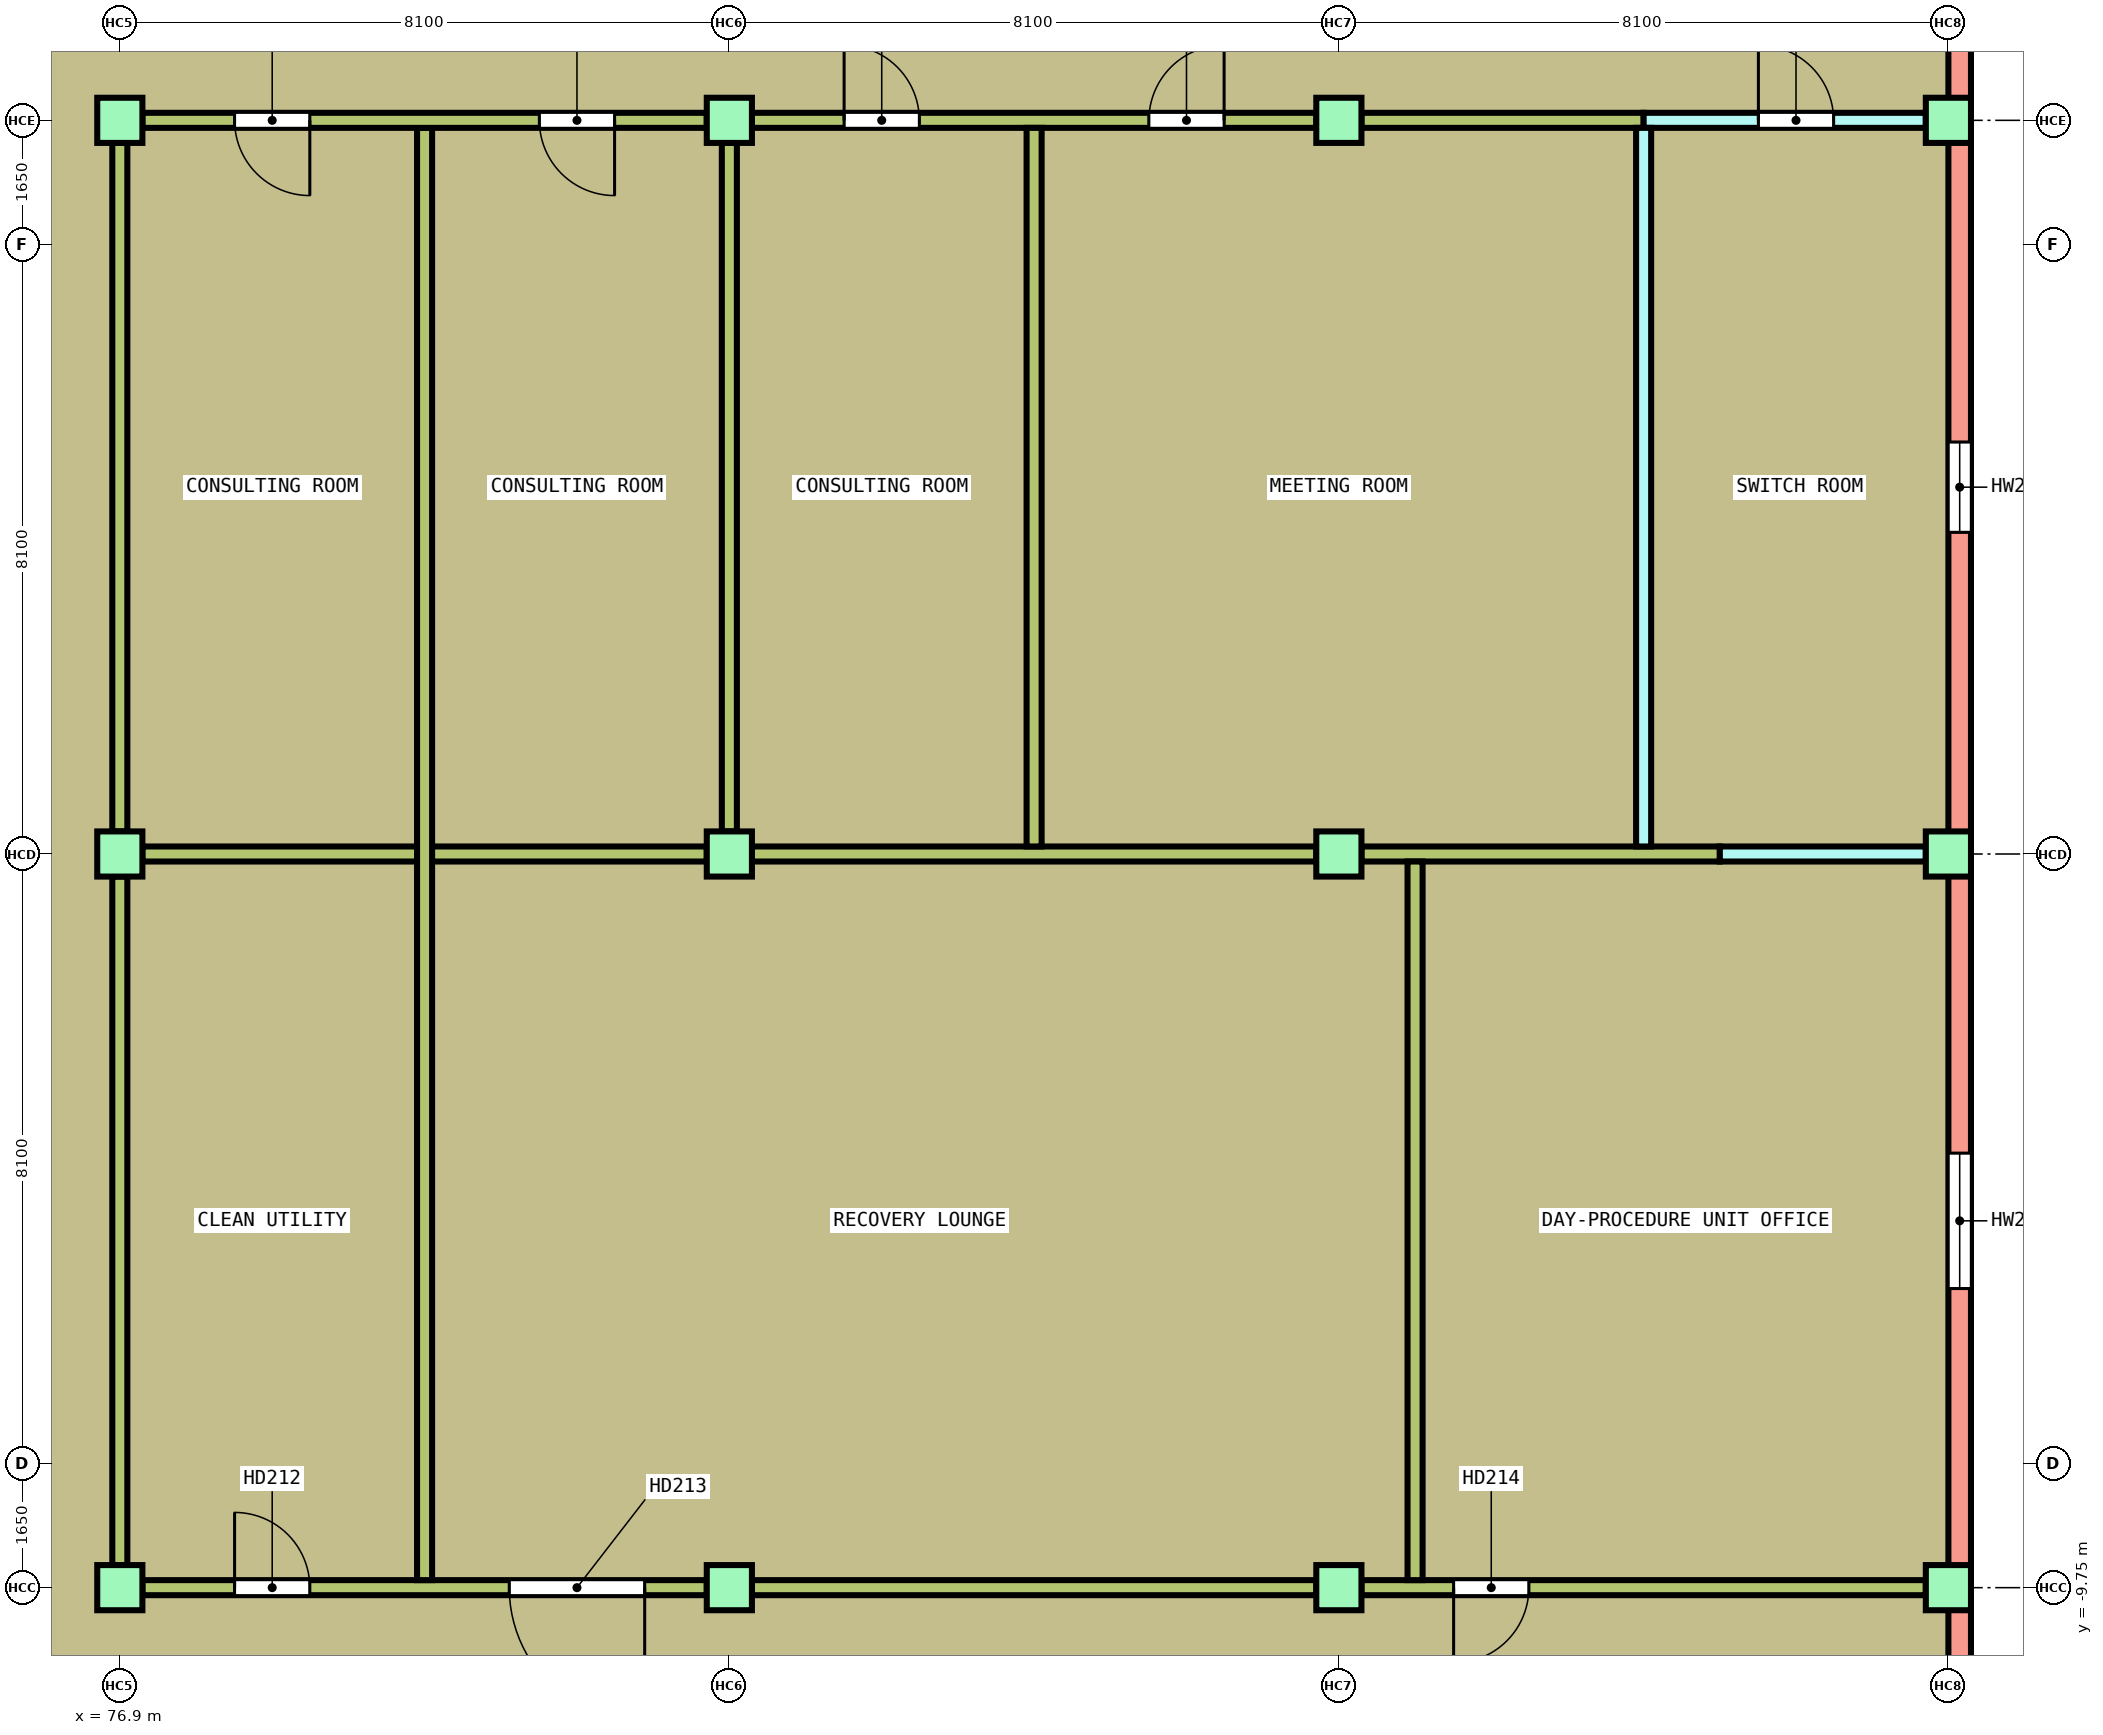
"""IFC4 building model, lengths in metres.
Left out: names, types, materials, properties, quantities, classifications, styles, units other than length and angle.
Written with IfcOpenShell. Run it as: python <this file> out.ifc"""

import sys

from ifc_helpers import new_model, si_unit, direction, frame, frame_2d, origin, origin_2d, place, context, subcontext, project, spatial, rectangle, extrude, element, fill, save


model = new_model("IFC4")
c1 = context("Model", 3, precision=1e-05, world=origin(), true_north=direction((0.0, 1.0)))
c2 = subcontext(c1, "Body", "Model", "MODEL_VIEW")
j1 = project(units=[si_unit("LENGTHUNIT", "METRE"), si_unit("PLANEANGLEUNIT", "RADIAN")], contexts=[c1])
p1 = place(None, origin())
s1 = spatial("IfcSite", under=j1, at=p1, CompositionType="ELEMENT")
p2 = place(p1, origin())
s2 = spatial("IfcBuilding", under=s1, at=p2, CompositionType="ELEMENT")
p3 = place(p2, frame((0.0, 0.0, 10.2)))
s3 = spatial("IfcBuildingStorey", under=s2, at=p3, CompositionType="ELEMENT", Elevation=10.2)
for number, where, z_axis, x_axis in (
    (1, (76.9, -9.75, 0.0), (0.0, 0.0, 1.0), (1.0, 0.0, 0.0)),
    (2, (85.0, -9.75, 0.0), (0.0, 0.0, 1.0), (1.0, 0.0, 0.0)),
    (3, (93.1, -9.75, 0.0), (0.0, 0.0, 1.0), (1.0, 0.0, 0.0)),
    (4, (101.2, -9.75, 0.0), (0.0, 0.0, 1.0), (1.0, 0.0, 0.0)),
    (5, (76.9, 0.0, 0.0), (0.0, 0.0, 1.0), (1.0, 0.0, 0.0)),
    (6, (85.0, 0.0, 0.0), (0.0, 0.0, 1.0), (1.0, 0.0, 0.0)),
    (7, (93.1, 0.0, 0.0), (0.0, 0.0, 1.0), (1.0, 0.0, 0.0)),
    (8, (101.2, 0.0, 0.0), (0.0, 0.0, 1.0), (1.0, 0.0, 0.0)),
    (9, (76.9, 9.75, 0.0), (0.0, 0.0, 1.0), (1.0, 0.0, 0.0)),
    (10, (85.0, 9.75, 0.0), (0.0, 0.0, 1.0), (1.0, 0.0, 0.0)),
    (11, (93.1, 9.75, 0.0), (0.0, 0.0, 1.0), (1.0, 0.0, 0.0)),
    (12, (101.2, 9.75, 0.0), (0.0, 0.0, 1.0), (1.0, 0.0, 0.0)),
):
    element("IfcColumn", number, at=place(p3, frame(where, z_axis=z_axis, x_axis=x_axis)), inside=s3, PredefinedType="COLUMN", context=c2, shape_type="SweptSolid", body=[
        extrude(rectangle(XDim=0.6, YDim=0.6, at=origin_2d()), origin(), (0.0, 0.0, 1.0), 4.15),
    ])
for number, where, z_axis, x_axis in (
    (13, (76.9, -9.45, 0.0), (0.0, 0.0, 1.0), (0.0, 1.0, 0.0)),
    (14, (76.9, 0.3, 0.0), (0.0, 0.0, 1.0), (0.0, 1.0, 0.0)),
):
    element("IfcWall", number, at=place(p3, frame(where, z_axis=z_axis, x_axis=x_axis)), inside=s3, PredefinedType="PARTITIONING", context=c2, shape_type="SweptSolid", body=[
        extrude(rectangle(XDim=9.15, YDim=0.2, at=frame_2d((4.575, 0.0))), origin(), (0.0, 0.0, 1.0), 3.6),
    ])
p4 = place(p3, frame((77.2, -9.75, 0.0), z_axis=(0.0, 0.0, 1.0), x_axis=(1.0, 0.0, 0.0)))
e15 = element("IfcWall", 15, at=p4, inside=s3, PredefinedType="PARTITIONING", context=c2, shape_type="SweptSolid", body=[
    extrude(rectangle(XDim=7.5, YDim=0.2, at=frame_2d((3.75, 0.0))), origin(), (0.0, 0.0, 1.0), 3.6),
])
p5 = place(p4, frame((1.225, 0.0, 0.0)))
e16 = element("IfcOpeningElement", 16, at=p5, cuts=e15, PredefinedType="OPENING", context=c2, shape_type="SweptSolid", body=[
    extrude(rectangle(XDim=1.0, YDim=2.1, at=frame_2d((0.5, 1.05))), frame((0.0, 0.11, 0.0), z_axis=(0.0, -1.0, 0.0), x_axis=(1.0, 0.0, 0.0)), (0.0, 0.0, 1.0), 0.22),
])
p6 = place(p4, frame((4.875, 0.0, 0.0)))
e17 = element("IfcOpeningElement", 17, at=p6, cuts=e15, PredefinedType="OPENING", context=c2, shape_type="SweptSolid", body=[
    extrude(rectangle(XDim=1.8, YDim=2.1, at=frame_2d((0.9, 1.05))), frame((0.0, 0.11, 0.0), z_axis=(0.0, -1.0, 0.0), x_axis=(1.0, 0.0, 0.0)), (0.0, 0.0, 1.0), 0.22),
])
p7 = place(p3, frame((85.3, -9.75, 0.0), z_axis=(0.0, 0.0, 1.0), x_axis=(1.0, 0.0, 0.0)))
e18 = element("IfcWall", 18, at=p7, inside=s3, PredefinedType="PARTITIONING", context=c2, shape_type="SweptSolid", body=[
    extrude(rectangle(XDim=7.5, YDim=0.2, at=frame_2d((3.75, 0.0))), origin(), (0.0, 0.0, 1.0), 3.6),
])
p8 = place(p3, frame((93.4, -9.75, 0.0), z_axis=(0.0, 0.0, 1.0), x_axis=(1.0, 0.0, 0.0)))
e19 = element("IfcWall", 19, at=p8, inside=s3, PredefinedType="PARTITIONING", context=c2, shape_type="SweptSolid", body=[
    extrude(rectangle(XDim=7.5, YDim=0.2, at=frame_2d((3.75, 0.0))), origin(), (0.0, 0.0, 1.0), 3.6),
])
p9 = place(p8, frame((1.225, 0.0, 0.0)))
e20 = element("IfcOpeningElement", 20, at=p9, cuts=e19, PredefinedType="OPENING", context=c2, shape_type="SweptSolid", body=[
    extrude(rectangle(XDim=1.0, YDim=2.1, at=frame_2d((0.5, 1.05))), frame((0.0, 0.11, 0.0), z_axis=(0.0, -1.0, 0.0), x_axis=(1.0, 0.0, 0.0)), (0.0, 0.0, 1.0), 0.22),
])
p10 = place(p3, frame((101.35, 20.25, 0.0), z_axis=(0.0, 0.0, 1.0), x_axis=(0.0, -1.0, 0.0)))
e21 = element("IfcWall", 21, at=p10, inside=s3, PredefinedType="SOLIDWALL", context=c2, shape_type="SweptSolid", body=[
    extrude(rectangle(XDim=33.0, YDim=0.3, at=frame_2d((16.5, 0.0))), origin(), (0.0, 0.0, 1.0), 3.6),
])
p11 = place(p10, frame((24.225, 0.0, 0.9)))
e22 = element("IfcOpeningElement", 22, at=p11, cuts=e21, PredefinedType="OPENING", context=c2, shape_type="SweptSolid", body=[
    extrude(rectangle(XDim=1.8, YDim=1.8, at=frame_2d((0.9, 0.9))), frame((0.0, 0.16, 0.0), z_axis=(0.0, -1.0, 0.0), x_axis=(1.0, 0.0, 0.0)), (0.0, 0.0, 1.0), 0.32),
])
p12 = place(p10, frame((14.775, 0.0, 1.5)))
e23 = element("IfcOpeningElement", 23, at=p12, cuts=e21, PredefinedType="OPENING", context=c2, shape_type="SweptSolid", body=[
    extrude(rectangle(XDim=1.2, YDim=0.9, at=frame_2d((0.6, 0.45))), frame((0.0, 0.16, 0.0), z_axis=(0.0, -1.0, 0.0), x_axis=(1.0, 0.0, 0.0)), (0.0, 0.0, 1.0), 0.32),
])
for number, where, z_axis, x_axis in (
    (24, (77.2, 0.0, 0.0), (0.0, 0.0, 1.0), (1.0, 0.0, 0.0)),
    (25, (85.3, 0.0, 0.0), (0.0, 0.0, 1.0), (1.0, 0.0, 0.0)),
):
    element("IfcWall", number, at=place(p3, frame(where, z_axis=z_axis, x_axis=x_axis)), inside=s3, PredefinedType="PARTITIONING", context=c2, shape_type="SweptSolid", body=[
        extrude(rectangle(XDim=7.5, YDim=0.2, at=frame_2d((3.75, 0.0))), origin(), (0.0, 0.0, 1.0), 3.6),
    ])
p13 = place(p3, frame((93.4, 0.0, 0.0), z_axis=(0.0, 0.0, 1.0), x_axis=(1.0, 0.0, 0.0)))
e26 = element("IfcWall", 26, at=p13, inside=s3, PredefinedType="PARTITIONING", context=c2, shape_type="SweptSolid", body=[
    extrude(rectangle(XDim=4.763, YDim=0.2, at=frame_2d((2.381, 0.0))), origin(), (0.0, 0.0, 1.0), 3.6),
])
p14 = place(p3, frame((98.163, 0.0, 0.0), z_axis=(0.0, 0.0, 1.0), x_axis=(1.0, 0.0, 0.0)))
e27 = element("IfcWall", 27, at=p14, inside=s3, PredefinedType="SOLIDWALL", context=c2, shape_type="SweptSolid", body=[
    extrude(rectangle(XDim=2.737, YDim=0.2, at=frame_2d((1.369, 0.0))), origin(), (0.0, 0.0, 1.0), 3.6),
])
p15 = place(p3, frame((80.95, -9.65, 0.0), z_axis=(0.0, 0.0, 1.0), x_axis=(0.0, 1.0, 0.0)))
e28 = element("IfcWall", 28, at=p15, inside=s3, PredefinedType="PARTITIONING", context=c2, shape_type="SweptSolid", body=[
    extrude(rectangle(XDim=19.3, YDim=0.2, at=frame_2d((9.65, 0.0))), origin(), (0.0, 0.0, 1.0), 3.6),
])
p16 = place(p3, frame((94.113, -9.65, 0.0), z_axis=(0.0, 0.0, 1.0), x_axis=(0.0, 1.0, 0.0)))
e29 = element("IfcWall", 29, at=p16, inside=s3, PredefinedType="PARTITIONING", context=c2, shape_type="SweptSolid", body=[
    extrude(rectangle(XDim=9.55, YDim=0.2, at=frame_2d((4.775, 0.0))), origin(), (0.0, 0.0, 1.0), 3.6),
])
p17 = place(p3, frame((77.2, 9.75, 0.0), z_axis=(0.0, 0.0, 1.0), x_axis=(1.0, 0.0, 0.0)))
e30 = element("IfcWall", 30, at=p17, inside=s3, PredefinedType="PARTITIONING", context=c2, shape_type="SweptSolid", body=[
    extrude(rectangle(XDim=7.5, YDim=0.2, at=frame_2d((3.75, 0.0))), origin(), (0.0, 0.0, 1.0), 3.6),
])
p18 = place(p17, frame((1.225, 0.0, 0.0)))
e31 = element("IfcOpeningElement", 31, at=p18, cuts=e30, PredefinedType="OPENING", context=c2, shape_type="SweptSolid", body=[
    extrude(rectangle(XDim=1.0, YDim=2.1, at=frame_2d((0.5, 1.05))), frame((0.0, 0.11, 0.0), z_axis=(0.0, -1.0, 0.0), x_axis=(1.0, 0.0, 0.0)), (0.0, 0.0, 1.0), 0.22),
])
p19 = place(p17, frame((5.275, 0.0, 0.0)))
e32 = element("IfcOpeningElement", 32, at=p19, cuts=e30, PredefinedType="OPENING", context=c2, shape_type="SweptSolid", body=[
    extrude(rectangle(XDim=1.0, YDim=2.1, at=frame_2d((0.5, 1.05))), frame((0.0, 0.11, 0.0), z_axis=(0.0, -1.0, 0.0), x_axis=(1.0, 0.0, 0.0)), (0.0, 0.0, 1.0), 0.22),
])
p20 = place(p3, frame((85.3, 9.75, 0.0), z_axis=(0.0, 0.0, 1.0), x_axis=(1.0, 0.0, 0.0)))
e33 = element("IfcWall", 33, at=p20, inside=s3, PredefinedType="PARTITIONING", context=c2, shape_type="SweptSolid", body=[
    extrude(rectangle(XDim=7.5, YDim=0.2, at=frame_2d((3.75, 0.0))), origin(), (0.0, 0.0, 1.0), 3.6),
])
p21 = place(p20, frame((1.225, 0.0, 0.0)))
e34 = element("IfcOpeningElement", 34, at=p21, cuts=e33, PredefinedType="OPENING", context=c2, shape_type="SweptSolid", body=[
    extrude(rectangle(XDim=1.0, YDim=2.1, at=frame_2d((0.5, 1.05))), frame((0.0, 0.11, 0.0), z_axis=(0.0, -1.0, 0.0), x_axis=(1.0, 0.0, 0.0)), (0.0, 0.0, 1.0), 0.22),
])
p22 = place(p20, frame((5.275, 0.0, 0.0)))
e35 = element("IfcOpeningElement", 35, at=p22, cuts=e33, PredefinedType="OPENING", context=c2, shape_type="SweptSolid", body=[
    extrude(rectangle(XDim=1.0, YDim=2.1, at=frame_2d((0.5, 1.05))), frame((0.0, 0.11, 0.0), z_axis=(0.0, -1.0, 0.0), x_axis=(1.0, 0.0, 0.0)), (0.0, 0.0, 1.0), 0.22),
])
p23 = place(p3, frame((93.4, 9.75, 0.0), z_axis=(0.0, 0.0, 1.0), x_axis=(1.0, 0.0, 0.0)))
e36 = element("IfcWall", 36, at=p23, inside=s3, PredefinedType="PARTITIONING", context=c2, shape_type="SweptSolid", body=[
    extrude(rectangle(XDim=3.75, YDim=0.2, at=frame_2d((1.875, 0.0))), origin(), (0.0, 0.0, 1.0), 3.6),
])
p24 = place(p3, frame((97.15, 9.75, 0.0), z_axis=(0.0, 0.0, 1.0), x_axis=(1.0, 0.0, 0.0)))
e37 = element("IfcWall", 37, at=p24, inside=s3, PredefinedType="SOLIDWALL", context=c2, shape_type="SweptSolid", body=[
    extrude(rectangle(XDim=3.75, YDim=0.2, at=frame_2d((1.875, 0.0))), origin(), (0.0, 0.0, 1.0), 3.6),
])
p25 = place(p24, frame((1.525, 0.0, 0.0)))
e38 = element("IfcOpeningElement", 38, at=p25, cuts=e37, PredefinedType="OPENING", context=c2, shape_type="SweptSolid", body=[
    extrude(rectangle(XDim=1.0, YDim=2.1, at=frame_2d((0.5, 1.05))), frame((0.0, 0.11, 0.0), z_axis=(0.0, -1.0, 0.0), x_axis=(1.0, 0.0, 0.0)), (0.0, 0.0, 1.0), 0.22),
])
p26 = place(p3, frame((85.0, 0.3, 0.0), z_axis=(0.0, 0.0, 1.0), x_axis=(0.0, 1.0, 0.0)))
e39 = element("IfcWall", 39, at=p26, inside=s3, PredefinedType="PARTITIONING", context=c2, shape_type="SweptSolid", body=[
    extrude(rectangle(XDim=9.15, YDim=0.2, at=frame_2d((4.575, 0.0))), origin(), (0.0, 0.0, 1.0), 3.6),
])
p27 = place(p3, frame((89.05, 0.1, 0.0), z_axis=(0.0, 0.0, 1.0), x_axis=(0.0, 1.0, 0.0)))
e40 = element("IfcWall", 40, at=p27, inside=s3, PredefinedType="PARTITIONING", context=c2, shape_type="SweptSolid", body=[
    extrude(rectangle(XDim=9.55, YDim=0.2, at=frame_2d((4.775, 0.0))), origin(), (0.0, 0.0, 1.0), 3.6),
])
p28 = place(p3, frame((97.15, 0.1, 0.0), z_axis=(0.0, 0.0, 1.0), x_axis=(0.0, 1.0, 0.0)))
e41 = element("IfcWall", 41, at=p28, inside=s3, PredefinedType="SOLIDWALL", context=c2, shape_type="SweptSolid", body=[
    extrude(rectangle(XDim=9.55, YDim=0.2, at=frame_2d((4.775, 0.0))), origin(), (0.0, 0.0, 1.0), 3.6),
])
p29 = place(p5, origin())
e42 = element("IfcDoor", 42, at=p29, inside=s3, OperationType="SINGLE_SWING_RIGHT", PredefinedType="DOOR", context=c2, shape_type="SweptSolid", body=[
    extrude(rectangle(XDim=1.0, YDim=2.1, at=frame_2d((0.5, 1.05))), frame((0.0, 0.025, 0.0), z_axis=(0.0, -1.0, 0.0), x_axis=(1.0, 0.0, 0.0)), (0.0, 0.0, 1.0), 0.05),
])
fill(e16, e42)
p30 = place(p6, origin())
e43 = element("IfcDoor", 43, at=p30, inside=s3, OperationType="DOUBLE_DOOR_SINGLE_SWING", PredefinedType="DOOR", context=c2, shape_type="SweptSolid", body=[
    extrude(rectangle(XDim=1.8, YDim=2.1, at=frame_2d((0.9, 1.05))), frame((0.0, 0.025, 0.0), z_axis=(0.0, -1.0, 0.0), x_axis=(1.0, 0.0, 0.0)), (0.0, 0.0, 1.0), 0.05),
])
fill(e17, e43)
p31 = place(p9, origin())
e44 = element("IfcDoor", 44, at=p31, inside=s3, OperationType="SINGLE_SWING_RIGHT", PredefinedType="DOOR", context=c2, shape_type="SweptSolid", body=[
    extrude(rectangle(XDim=1.0, YDim=2.1, at=frame_2d((0.5, 1.05))), frame((0.0, 0.025, 0.0), z_axis=(0.0, -1.0, 0.0), x_axis=(1.0, 0.0, 0.0)), (0.0, 0.0, 1.0), 0.05),
])
fill(e20, e44)
p32 = place(p18, origin())
e45 = element("IfcDoor", 45, at=p32, inside=s3, OperationType="SINGLE_SWING_LEFT", PredefinedType="DOOR", context=c2, shape_type="SweptSolid", body=[
    extrude(rectangle(XDim=1.0, YDim=2.1, at=frame_2d((0.5, 1.05))), frame((0.0, 0.025, 0.0), z_axis=(0.0, -1.0, 0.0), x_axis=(1.0, 0.0, 0.0)), (0.0, 0.0, 1.0), 0.05),
])
fill(e31, e45)
p33 = place(p19, origin())
e46 = element("IfcDoor", 46, at=p33, inside=s3, OperationType="SINGLE_SWING_RIGHT", PredefinedType="DOOR", context=c2, shape_type="SweptSolid", body=[
    extrude(rectangle(XDim=1.0, YDim=2.1, at=frame_2d((0.5, 1.05))), frame((0.0, 0.025, 0.0), z_axis=(0.0, -1.0, 0.0), x_axis=(1.0, 0.0, 0.0)), (0.0, 0.0, 1.0), 0.05),
])
fill(e32, e46)
p34 = place(p21, origin())
e47 = element("IfcDoor", 47, at=p34, inside=s3, OperationType="SINGLE_SWING_LEFT", PredefinedType="DOOR", context=c2, shape_type="SweptSolid", body=[
    extrude(rectangle(XDim=1.0, YDim=2.1, at=frame_2d((0.5, 1.05))), frame((0.0, 0.025, 0.0), z_axis=(0.0, -1.0, 0.0), x_axis=(1.0, 0.0, 0.0)), (0.0, 0.0, 1.0), 0.05),
])
fill(e34, e47)
p35 = place(p22, origin())
e48 = element("IfcDoor", 48, at=p35, inside=s3, OperationType="SINGLE_SWING_RIGHT", PredefinedType="DOOR", context=c2, shape_type="SweptSolid", body=[
    extrude(rectangle(XDim=1.0, YDim=2.1, at=frame_2d((0.5, 1.05))), frame((0.0, 0.025, 0.0), z_axis=(0.0, -1.0, 0.0), x_axis=(1.0, 0.0, 0.0)), (0.0, 0.0, 1.0), 0.05),
])
fill(e35, e48)
p36 = place(p25, origin())
e49 = element("IfcDoor", 49, at=p36, inside=s3, OperationType="SINGLE_SWING_LEFT", PredefinedType="DOOR", context=c2, shape_type="SweptSolid", body=[
    extrude(rectangle(XDim=1.0, YDim=2.1, at=frame_2d((0.5, 1.05))), frame((0.0, 0.025, 0.0), z_axis=(0.0, -1.0, 0.0), x_axis=(1.0, 0.0, 0.0)), (0.0, 0.0, 1.0), 0.05),
])
fill(e38, e49)
p37 = place(p11, origin())
e50 = element("IfcWindow", 50, at=p37, inside=s3, PartitioningType="SINGLE_PANEL", PredefinedType="WINDOW", context=c2, shape_type="SweptSolid", body=[
    extrude(rectangle(XDim=1.8, YDim=1.8, at=frame_2d((0.9, 0.9))), frame((0.0, 0.03, 0.0), z_axis=(0.0, -1.0, 0.0), x_axis=(1.0, 0.0, 0.0)), (0.0, 0.0, 1.0), 0.06),
])
fill(e22, e50)
p38 = place(p12, origin())
e51 = element("IfcWindow", 51, at=p38, inside=s3, PartitioningType="SINGLE_PANEL", PredefinedType="WINDOW", context=c2, shape_type="SweptSolid", body=[
    extrude(rectangle(XDim=1.2, YDim=0.9, at=frame_2d((0.6, 0.45))), frame((0.0, 0.03, 0.0), z_axis=(0.0, -1.0, 0.0), x_axis=(1.0, 0.0, 0.0)), (0.0, 0.0, 1.0), 0.06),
])
fill(e23, e51)
save(model, sys.argv[1])
